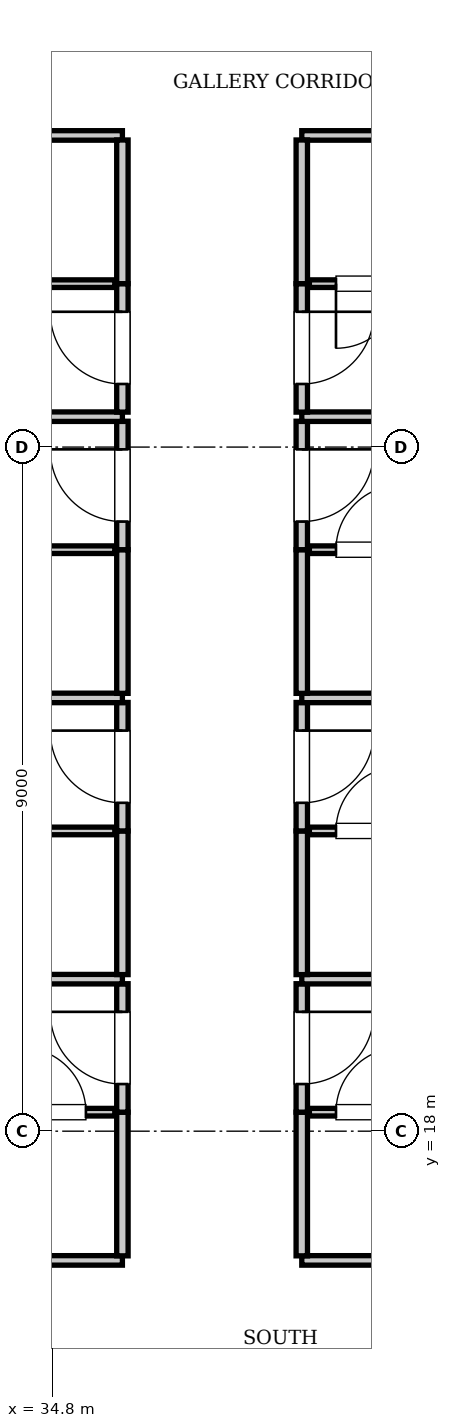
"""IFC4 building model, lengths in metres.
Left out: names, types, materials, properties, quantities, classifications, styles, units other than length and angle.
Written with IfcOpenShell. Run it as: python <this file> out.ifc"""

import sys

from ifc_helpers import new_model, si_unit, direction, frame, frame_2d, origin, place, context, subcontext, project, spatial, rectangle, extrude, element, fill, save


model = new_model("IFC4")
c1 = context("Model", 3, precision=1e-05, world=origin(), true_north=direction((0.0, 1.0)))
c2 = subcontext(c1, "Body", "Model", "MODEL_VIEW")
j1 = project(units=[si_unit("LENGTHUNIT", "METRE"), si_unit("PLANEANGLEUNIT", "RADIAN")], contexts=[c1])
p1 = place(None, origin())
s1 = spatial("IfcSite", under=j1, at=p1, CompositionType="ELEMENT")
p2 = place(p1, origin())
s2 = spatial("IfcBuilding", under=s1, at=p2, CompositionType="ELEMENT")
p3 = place(p2, frame((0.0, 0.0, 189.0)))
s3 = spatial("IfcBuildingStorey", under=s2, at=p3, CompositionType="ELEMENT", Elevation=189.0)
p4 = place(p3, frame((13.2, 16.3, 0.0), z_axis=(0.0, 0.0, 1.0), x_axis=(1.0, 0.0, 0.0)))
e1 = element("IfcWall", 1, at=p4, inside=s3, PredefinedType="PARTITIONING", context=c2, shape_type="SweptSolid", body=[
    extrude(rectangle(XDim=22.52, YDim=0.125, at=frame_2d((11.26, 0.0))), origin(), (0.0, 0.0, 1.0), 3.61),
])
p5 = place(p3, frame((38.08, 16.3, 0.0), z_axis=(0.0, 0.0, 1.0), x_axis=(1.0, 0.0, 0.0)))
e2 = element("IfcWall", 2, at=p5, inside=s3, PredefinedType="PARTITIONING", context=c2, shape_type="SweptSolid", body=[
    extrude(rectangle(XDim=24.32, YDim=0.125, at=frame_2d((12.16, 0.0))), origin(), (0.0, 0.0, 1.0), 3.61),
])
p6 = place(p3, frame((13.2, 31.1, 0.0), z_axis=(0.0, 0.0, 1.0), x_axis=(1.0, 0.0, 0.0)))
e3 = element("IfcWall", 3, at=p6, inside=s3, PredefinedType="PARTITIONING", context=c2, shape_type="SweptSolid", body=[
    extrude(rectangle(XDim=22.52, YDim=0.125, at=frame_2d((11.26, 0.0))), origin(), (0.0, 0.0, 1.0), 3.61),
])
p7 = place(p3, frame((38.08, 31.1, 0.0), z_axis=(0.0, 0.0, 1.0), x_axis=(1.0, 0.0, 0.0)))
e4 = element("IfcWall", 4, at=p7, inside=s3, PredefinedType="PARTITIONING", context=c2, shape_type="SweptSolid", body=[
    extrude(rectangle(XDim=24.32, YDim=0.125, at=frame_2d((12.16, 0.0))), origin(), (0.0, 0.0, 1.0), 3.61),
])
p8 = place(p3, frame((35.72, 16.36, 0.0), z_axis=(0.0, 0.0, 1.0), x_axis=(0.0, 1.0, 0.0)))
e5 = element("IfcWall", 5, at=p8, inside=s3, PredefinedType="PARTITIONING", context=c2, shape_type="SweptSolid", body=[
    extrude(rectangle(XDim=1.89, YDim=0.15, at=frame_2d((0.945, 0.0))), origin(), (0.0, 0.0, 1.0), 3.61),
])
p9 = place(p3, frame((35.72, 18.25, 0.0), z_axis=(0.0, 0.0, 1.0), x_axis=(0.0, 1.0, 0.0)))
e6 = element("IfcWall", 6, at=p9, inside=s3, PredefinedType="PARTITIONING", context=c2, shape_type="SweptSolid", body=[
    extrude(rectangle(XDim=1.69, YDim=0.15, at=frame_2d((0.845, 0.0))), origin(), (0.0, 0.0, 1.0), 3.61),
])
p10 = place(p9, frame((0.37, 0.0, 0.0)))
e7 = element("IfcOpeningElement", 7, at=p10, cuts=e6, PredefinedType="OPENING", context=c2, shape_type="SweptSolid", body=[
    extrude(rectangle(XDim=0.95, YDim=2.15, at=frame_2d((0.475, 1.075))), frame((0.0, 0.085, 0.0), z_axis=(0.0, -1.0, 0.0), x_axis=(1.0, 0.0, 0.0)), (0.0, 0.0, 1.0), 0.17),
])
p11 = place(p3, frame((33.32, 18.25, 0.0), z_axis=(0.0, 0.0, 1.0), x_axis=(1.0, 0.0, 0.0)))
e8 = element("IfcWall", 8, at=p11, inside=s3, PredefinedType="PARTITIONING", context=c2, shape_type="SweptSolid", body=[
    extrude(rectangle(XDim=2.3, YDim=0.1, at=frame_2d((1.15, 0.0))), origin(), (0.0, 0.0, 1.0), 3.61),
])
p12 = place(p11, frame((1.07, 0.0, 0.0)))
e9 = element("IfcOpeningElement", 9, at=p12, cuts=e8, PredefinedType="OPENING", context=c2, shape_type="SweptSolid", body=[
    extrude(rectangle(XDim=0.85, YDim=2.1, at=frame_2d((0.425, 1.05))), frame((0.0, 0.06, 0.0), z_axis=(0.0, -1.0, 0.0), x_axis=(1.0, 0.0, 0.0)), (0.0, 0.0, 1.0), 0.12),
])
p13 = place(p3, frame((38.08, 16.36, 0.0), z_axis=(0.0, 0.0, 1.0), x_axis=(0.0, 1.0, 0.0)))
e10 = element("IfcWall", 10, at=p13, inside=s3, PredefinedType="PARTITIONING", context=c2, shape_type="SweptSolid", body=[
    extrude(rectangle(XDim=1.89, YDim=0.15, at=frame_2d((0.945, 0.0))), origin(), (0.0, 0.0, 1.0), 3.61),
])
p14 = place(p3, frame((38.08, 18.25, 0.0), z_axis=(0.0, 0.0, 1.0), x_axis=(0.0, 1.0, 0.0)))
e11 = element("IfcWall", 11, at=p14, inside=s3, PredefinedType="PARTITIONING", context=c2, shape_type="SweptSolid", body=[
    extrude(rectangle(XDim=1.69, YDim=0.15, at=frame_2d((0.845, 0.0))), origin(), (0.0, 0.0, 1.0), 3.61),
])
p15 = place(p14, frame((0.37, 0.0, 0.0)))
e12 = element("IfcOpeningElement", 12, at=p15, cuts=e11, PredefinedType="OPENING", context=c2, shape_type="SweptSolid", body=[
    extrude(rectangle(XDim=0.95, YDim=2.15, at=frame_2d((0.475, 1.075))), frame((0.0, 0.085, 0.0), z_axis=(0.0, -1.0, 0.0), x_axis=(1.0, 0.0, 0.0)), (0.0, 0.0, 1.0), 0.17),
])
p16 = place(p3, frame((38.18, 18.25, 0.0), z_axis=(0.0, 0.0, 1.0), x_axis=(1.0, 0.0, 0.0)))
e13 = element("IfcWall", 13, at=p16, inside=s3, PredefinedType="PARTITIONING", context=c2, shape_type="SweptSolid", body=[
    extrude(rectangle(XDim=2.3, YDim=0.1, at=frame_2d((1.15, 0.0))), origin(), (0.0, 0.0, 1.0), 3.61),
])
p17 = place(p16, frame((0.35, 0.0, 0.0)))
e14 = element("IfcOpeningElement", 14, at=p17, cuts=e13, PredefinedType="OPENING", context=c2, shape_type="SweptSolid", body=[
    extrude(rectangle(XDim=0.85, YDim=2.1, at=frame_2d((0.425, 1.05))), frame((0.0, 0.06, 0.0), z_axis=(0.0, -1.0, 0.0), x_axis=(1.0, 0.0, 0.0)), (0.0, 0.0, 1.0), 0.12),
])
p18 = place(p3, frame((13.2, 20.0, 0.0), z_axis=(0.0, 0.0, 1.0), x_axis=(1.0, 0.0, 0.0)))
e15 = element("IfcWall", 15, at=p18, inside=s3, PredefinedType="PARTITIONING", context=c2, shape_type="SweptSolid", body=[
    extrude(rectangle(XDim=22.52, YDim=0.125, at=frame_2d((11.26, 0.0))), origin(), (0.0, 0.0, 1.0), 3.61),
])
p19 = place(p3, frame((38.08, 20.0, 0.0), z_axis=(0.0, 0.0, 1.0), x_axis=(1.0, 0.0, 0.0)))
e16 = element("IfcWall", 16, at=p19, inside=s3, PredefinedType="PARTITIONING", context=c2, shape_type="SweptSolid", body=[
    extrude(rectangle(XDim=24.32, YDim=0.125, at=frame_2d((12.16, 0.0))), origin(), (0.0, 0.0, 1.0), 3.61),
])
p20 = place(p3, frame((35.72, 20.06, 0.0), z_axis=(0.0, 0.0, 1.0), x_axis=(0.0, 1.0, 0.0)))
e17 = element("IfcWall", 17, at=p20, inside=s3, PredefinedType="PARTITIONING", context=c2, shape_type="SweptSolid", body=[
    extrude(rectangle(XDim=1.89, YDim=0.15, at=frame_2d((0.945, 0.0))), origin(), (0.0, 0.0, 1.0), 3.61),
])
p21 = place(p3, frame((35.72, 21.95, 0.0), z_axis=(0.0, 0.0, 1.0), x_axis=(0.0, 1.0, 0.0)))
e18 = element("IfcWall", 18, at=p21, inside=s3, PredefinedType="PARTITIONING", context=c2, shape_type="SweptSolid", body=[
    extrude(rectangle(XDim=1.69, YDim=0.15, at=frame_2d((0.845, 0.0))), origin(), (0.0, 0.0, 1.0), 3.61),
])
p22 = place(p21, frame((0.37, 0.0, 0.0)))
e19 = element("IfcOpeningElement", 19, at=p22, cuts=e18, PredefinedType="OPENING", context=c2, shape_type="SweptSolid", body=[
    extrude(rectangle(XDim=0.95, YDim=2.15, at=frame_2d((0.475, 1.075))), frame((0.0, 0.085, 0.0), z_axis=(0.0, -1.0, 0.0), x_axis=(1.0, 0.0, 0.0)), (0.0, 0.0, 1.0), 0.17),
])
p23 = place(p3, frame((33.32, 21.95, 0.0), z_axis=(0.0, 0.0, 1.0), x_axis=(1.0, 0.0, 0.0)))
e20 = element("IfcWall", 20, at=p23, inside=s3, PredefinedType="PARTITIONING", context=c2, shape_type="SweptSolid", body=[
    extrude(rectangle(XDim=2.3, YDim=0.1, at=frame_2d((1.15, 0.0))), origin(), (0.0, 0.0, 1.0), 3.61),
])
p24 = place(p23, frame((0.35, 0.0, 0.0)))
e21 = element("IfcOpeningElement", 21, at=p24, cuts=e20, PredefinedType="OPENING", context=c2, shape_type="SweptSolid", body=[
    extrude(rectangle(XDim=0.85, YDim=2.1, at=frame_2d((0.425, 1.05))), frame((0.0, 0.06, 0.0), z_axis=(0.0, -1.0, 0.0), x_axis=(1.0, 0.0, 0.0)), (0.0, 0.0, 1.0), 0.12),
])
p25 = place(p3, frame((38.08, 20.06, 0.0), z_axis=(0.0, 0.0, 1.0), x_axis=(0.0, 1.0, 0.0)))
e22 = element("IfcWall", 22, at=p25, inside=s3, PredefinedType="PARTITIONING", context=c2, shape_type="SweptSolid", body=[
    extrude(rectangle(XDim=1.89, YDim=0.15, at=frame_2d((0.945, 0.0))), origin(), (0.0, 0.0, 1.0), 3.61),
])
p26 = place(p3, frame((38.08, 21.95, 0.0), z_axis=(0.0, 0.0, 1.0), x_axis=(0.0, 1.0, 0.0)))
e23 = element("IfcWall", 23, at=p26, inside=s3, PredefinedType="PARTITIONING", context=c2, shape_type="SweptSolid", body=[
    extrude(rectangle(XDim=1.69, YDim=0.15, at=frame_2d((0.845, 0.0))), origin(), (0.0, 0.0, 1.0), 3.61),
])
p27 = place(p26, frame((0.37, 0.0, 0.0)))
e24 = element("IfcOpeningElement", 24, at=p27, cuts=e23, PredefinedType="OPENING", context=c2, shape_type="SweptSolid", body=[
    extrude(rectangle(XDim=0.95, YDim=2.15, at=frame_2d((0.475, 1.075))), frame((0.0, 0.085, 0.0), z_axis=(0.0, -1.0, 0.0), x_axis=(1.0, 0.0, 0.0)), (0.0, 0.0, 1.0), 0.17),
])
p28 = place(p3, frame((38.18, 21.95, 0.0), z_axis=(0.0, 0.0, 1.0), x_axis=(1.0, 0.0, 0.0)))
e25 = element("IfcWall", 25, at=p28, inside=s3, PredefinedType="PARTITIONING", context=c2, shape_type="SweptSolid", body=[
    extrude(rectangle(XDim=2.3, YDim=0.1, at=frame_2d((1.15, 0.0))), origin(), (0.0, 0.0, 1.0), 3.61),
])
p29 = place(p28, frame((0.35, 0.0, 0.0)))
e26 = element("IfcOpeningElement", 26, at=p29, cuts=e25, PredefinedType="OPENING", context=c2, shape_type="SweptSolid", body=[
    extrude(rectangle(XDim=0.85, YDim=2.1, at=frame_2d((0.425, 1.05))), frame((0.0, 0.06, 0.0), z_axis=(0.0, -1.0, 0.0), x_axis=(1.0, 0.0, 0.0)), (0.0, 0.0, 1.0), 0.12),
])
p30 = place(p3, frame((13.2, 23.7, 0.0), z_axis=(0.0, 0.0, 1.0), x_axis=(1.0, 0.0, 0.0)))
e27 = element("IfcWall", 27, at=p30, inside=s3, PredefinedType="PARTITIONING", context=c2, shape_type="SweptSolid", body=[
    extrude(rectangle(XDim=22.52, YDim=0.125, at=frame_2d((11.26, 0.0))), origin(), (0.0, 0.0, 1.0), 3.61),
])
p31 = place(p3, frame((38.08, 23.7, 0.0), z_axis=(0.0, 0.0, 1.0), x_axis=(1.0, 0.0, 0.0)))
e28 = element("IfcWall", 28, at=p31, inside=s3, PredefinedType="PARTITIONING", context=c2, shape_type="SweptSolid", body=[
    extrude(rectangle(XDim=24.32, YDim=0.125, at=frame_2d((12.16, 0.0))), origin(), (0.0, 0.0, 1.0), 3.61),
])
p32 = place(p3, frame((35.72, 23.76, 0.0), z_axis=(0.0, 0.0, 1.0), x_axis=(0.0, 1.0, 0.0)))
e29 = element("IfcWall", 29, at=p32, inside=s3, PredefinedType="PARTITIONING", context=c2, shape_type="SweptSolid", body=[
    extrude(rectangle(XDim=1.89, YDim=0.15, at=frame_2d((0.945, 0.0))), origin(), (0.0, 0.0, 1.0), 3.61),
])
p33 = place(p3, frame((35.72, 25.65, 0.0), z_axis=(0.0, 0.0, 1.0), x_axis=(0.0, 1.0, 0.0)))
e30 = element("IfcWall", 30, at=p33, inside=s3, PredefinedType="PARTITIONING", context=c2, shape_type="SweptSolid", body=[
    extrude(rectangle(XDim=1.69, YDim=0.15, at=frame_2d((0.845, 0.0))), origin(), (0.0, 0.0, 1.0), 3.61),
])
p34 = place(p33, frame((0.37, 0.0, 0.0)))
e31 = element("IfcOpeningElement", 31, at=p34, cuts=e30, PredefinedType="OPENING", context=c2, shape_type="SweptSolid", body=[
    extrude(rectangle(XDim=0.95, YDim=2.15, at=frame_2d((0.475, 1.075))), frame((0.0, 0.085, 0.0), z_axis=(0.0, -1.0, 0.0), x_axis=(1.0, 0.0, 0.0)), (0.0, 0.0, 1.0), 0.17),
])
p35 = place(p3, frame((33.32, 25.65, 0.0), z_axis=(0.0, 0.0, 1.0), x_axis=(1.0, 0.0, 0.0)))
e32 = element("IfcWall", 32, at=p35, inside=s3, PredefinedType="PARTITIONING", context=c2, shape_type="SweptSolid", body=[
    extrude(rectangle(XDim=2.3, YDim=0.1, at=frame_2d((1.15, 0.0))), origin(), (0.0, 0.0, 1.0), 3.61),
])
p36 = place(p35, frame((0.35, 0.0, 0.0)))
e33 = element("IfcOpeningElement", 33, at=p36, cuts=e32, PredefinedType="OPENING", context=c2, shape_type="SweptSolid", body=[
    extrude(rectangle(XDim=0.85, YDim=2.1, at=frame_2d((0.425, 1.05))), frame((0.0, 0.06, 0.0), z_axis=(0.0, -1.0, 0.0), x_axis=(1.0, 0.0, 0.0)), (0.0, 0.0, 1.0), 0.12),
])
p37 = place(p3, frame((38.08, 23.76, 0.0), z_axis=(0.0, 0.0, 1.0), x_axis=(0.0, 1.0, 0.0)))
e34 = element("IfcWall", 34, at=p37, inside=s3, PredefinedType="PARTITIONING", context=c2, shape_type="SweptSolid", body=[
    extrude(rectangle(XDim=1.89, YDim=0.15, at=frame_2d((0.945, 0.0))), origin(), (0.0, 0.0, 1.0), 3.61),
])
p38 = place(p3, frame((38.08, 25.65, 0.0), z_axis=(0.0, 0.0, 1.0), x_axis=(0.0, 1.0, 0.0)))
e35 = element("IfcWall", 35, at=p38, inside=s3, PredefinedType="PARTITIONING", context=c2, shape_type="SweptSolid", body=[
    extrude(rectangle(XDim=1.69, YDim=0.15, at=frame_2d((0.845, 0.0))), origin(), (0.0, 0.0, 1.0), 3.61),
])
p39 = place(p38, frame((0.37, 0.0, 0.0)))
e36 = element("IfcOpeningElement", 36, at=p39, cuts=e35, PredefinedType="OPENING", context=c2, shape_type="SweptSolid", body=[
    extrude(rectangle(XDim=0.95, YDim=2.15, at=frame_2d((0.475, 1.075))), frame((0.0, 0.085, 0.0), z_axis=(0.0, -1.0, 0.0), x_axis=(1.0, 0.0, 0.0)), (0.0, 0.0, 1.0), 0.17),
])
p40 = place(p3, frame((38.18, 25.65, 0.0), z_axis=(0.0, 0.0, 1.0), x_axis=(1.0, 0.0, 0.0)))
e37 = element("IfcWall", 37, at=p40, inside=s3, PredefinedType="PARTITIONING", context=c2, shape_type="SweptSolid", body=[
    extrude(rectangle(XDim=2.3, YDim=0.1, at=frame_2d((1.15, 0.0))), origin(), (0.0, 0.0, 1.0), 3.61),
])
p41 = place(p40, frame((0.35, 0.0, 0.0)))
e38 = element("IfcOpeningElement", 38, at=p41, cuts=e37, PredefinedType="OPENING", context=c2, shape_type="SweptSolid", body=[
    extrude(rectangle(XDim=0.85, YDim=2.1, at=frame_2d((0.425, 1.05))), frame((0.0, 0.06, 0.0), z_axis=(0.0, -1.0, 0.0), x_axis=(1.0, 0.0, 0.0)), (0.0, 0.0, 1.0), 0.12),
])
p42 = place(p3, frame((13.2, 27.4, 0.0), z_axis=(0.0, 0.0, 1.0), x_axis=(1.0, 0.0, 0.0)))
e39 = element("IfcWall", 39, at=p42, inside=s3, PredefinedType="PARTITIONING", context=c2, shape_type="SweptSolid", body=[
    extrude(rectangle(XDim=22.52, YDim=0.125, at=frame_2d((11.26, 0.0))), origin(), (0.0, 0.0, 1.0), 3.61),
])
p43 = place(p3, frame((38.08, 27.4, 0.0), z_axis=(0.0, 0.0, 1.0), x_axis=(1.0, 0.0, 0.0)))
e40 = element("IfcWall", 40, at=p43, inside=s3, PredefinedType="PARTITIONING", context=c2, shape_type="SweptSolid", body=[
    extrude(rectangle(XDim=24.32, YDim=0.125, at=frame_2d((12.16, 0.0))), origin(), (0.0, 0.0, 1.0), 3.61),
])
p44 = place(p3, frame((35.72, 27.46, 0.0), z_axis=(0.0, 0.0, 1.0), x_axis=(0.0, 1.0, 0.0)))
e41 = element("IfcWall", 41, at=p44, inside=s3, PredefinedType="PARTITIONING", context=c2, shape_type="SweptSolid", body=[
    extrude(rectangle(XDim=1.69, YDim=0.15, at=frame_2d((0.845, 0.0))), origin(), (0.0, 0.0, 1.0), 3.61),
])
p45 = place(p44, frame((0.37, 0.0, 0.0)))
e42 = element("IfcOpeningElement", 42, at=p45, cuts=e41, PredefinedType="OPENING", context=c2, shape_type="SweptSolid", body=[
    extrude(rectangle(XDim=0.95, YDim=2.15, at=frame_2d((0.475, 1.075))), frame((0.0, 0.085, 0.0), z_axis=(0.0, -1.0, 0.0), x_axis=(1.0, 0.0, 0.0)), (0.0, 0.0, 1.0), 0.17),
])
p46 = place(p3, frame((35.72, 29.15, 0.0), z_axis=(0.0, 0.0, 1.0), x_axis=(0.0, 1.0, 0.0)))
e43 = element("IfcWall", 43, at=p46, inside=s3, PredefinedType="PARTITIONING", context=c2, shape_type="SweptSolid", body=[
    extrude(rectangle(XDim=1.89, YDim=0.15, at=frame_2d((0.945, 0.0))), origin(), (0.0, 0.0, 1.0), 3.61),
])
p47 = place(p3, frame((33.32, 29.15, 0.0), z_axis=(0.0, 0.0, 1.0), x_axis=(1.0, 0.0, 0.0)))
e44 = element("IfcWall", 44, at=p47, inside=s3, PredefinedType="PARTITIONING", context=c2, shape_type="SweptSolid", body=[
    extrude(rectangle(XDim=2.3, YDim=0.1, at=frame_2d((1.15, 0.0))), origin(), (0.0, 0.0, 1.0), 3.61),
])
p48 = place(p47, frame((0.35, 0.0, 0.0)))
e45 = element("IfcOpeningElement", 45, at=p48, cuts=e44, PredefinedType="OPENING", context=c2, shape_type="SweptSolid", body=[
    extrude(rectangle(XDim=0.85, YDim=2.1, at=frame_2d((0.425, 1.05))), frame((0.0, 0.06, 0.0), z_axis=(0.0, -1.0, 0.0), x_axis=(1.0, 0.0, 0.0)), (0.0, 0.0, 1.0), 0.12),
])
p49 = place(p3, frame((38.08, 27.46, 0.0), z_axis=(0.0, 0.0, 1.0), x_axis=(0.0, 1.0, 0.0)))
e46 = element("IfcWall", 46, at=p49, inside=s3, PredefinedType="PARTITIONING", context=c2, shape_type="SweptSolid", body=[
    extrude(rectangle(XDim=1.69, YDim=0.15, at=frame_2d((0.845, 0.0))), origin(), (0.0, 0.0, 1.0), 3.61),
])
p50 = place(p49, frame((0.37, 0.0, 0.0)))
e47 = element("IfcOpeningElement", 47, at=p50, cuts=e46, PredefinedType="OPENING", context=c2, shape_type="SweptSolid", body=[
    extrude(rectangle(XDim=0.95, YDim=2.15, at=frame_2d((0.475, 1.075))), frame((0.0, 0.085, 0.0), z_axis=(0.0, -1.0, 0.0), x_axis=(1.0, 0.0, 0.0)), (0.0, 0.0, 1.0), 0.17),
])
p51 = place(p3, frame((38.08, 29.15, 0.0), z_axis=(0.0, 0.0, 1.0), x_axis=(0.0, 1.0, 0.0)))
e48 = element("IfcWall", 48, at=p51, inside=s3, PredefinedType="PARTITIONING", context=c2, shape_type="SweptSolid", body=[
    extrude(rectangle(XDim=1.89, YDim=0.15, at=frame_2d((0.945, 0.0))), origin(), (0.0, 0.0, 1.0), 3.61),
])
p52 = place(p3, frame((38.18, 29.15, 0.0), z_axis=(0.0, 0.0, 1.0), x_axis=(1.0, 0.0, 0.0)))
e49 = element("IfcWall", 49, at=p52, inside=s3, PredefinedType="PARTITIONING", context=c2, shape_type="SweptSolid", body=[
    extrude(rectangle(XDim=2.3, YDim=0.1, at=frame_2d((1.15, 0.0))), origin(), (0.0, 0.0, 1.0), 3.61),
])
p53 = place(p52, frame((0.35, 0.0, 0.0)))
e50 = element("IfcOpeningElement", 50, at=p53, cuts=e49, PredefinedType="OPENING", context=c2, shape_type="SweptSolid", body=[
    extrude(rectangle(XDim=0.85, YDim=2.1, at=frame_2d((0.425, 1.05))), frame((0.0, 0.06, 0.0), z_axis=(0.0, -1.0, 0.0), x_axis=(1.0, 0.0, 0.0)), (0.0, 0.0, 1.0), 0.12),
])
p54 = place(p12, origin())
e51 = element("IfcDoor", 51, at=p54, inside=s3, OperationType="SINGLE_SWING_LEFT", PredefinedType="DOOR", context=c2, shape_type="SweptSolid", body=[
    extrude(rectangle(XDim=0.85, YDim=2.1, at=frame_2d((0.425, 1.05))), frame((0.0, 0.025, 0.0), z_axis=(0.0, -1.0, 0.0), x_axis=(1.0, 0.0, 0.0)), (0.0, 0.0, 1.0), 0.05),
])
fill(e9, e51)
p55 = place(p10, origin())
e52 = element("IfcDoor", 52, at=p55, inside=s3, OperationType="SINGLE_SWING_RIGHT", PredefinedType="DOOR", context=c2, shape_type="SweptSolid", body=[
    extrude(rectangle(XDim=0.95, YDim=2.15, at=frame_2d((0.475, 1.075))), frame((0.0, 0.025, 0.0), z_axis=(0.0, -1.0, 0.0), x_axis=(1.0, 0.0, 0.0)), (0.0, 0.0, 1.0), 0.05),
])
fill(e7, e52)
p56 = place(p17, origin())
e53 = element("IfcDoor", 53, at=p56, inside=s3, OperationType="SINGLE_SWING_RIGHT", PredefinedType="DOOR", context=c2, shape_type="SweptSolid", body=[
    extrude(rectangle(XDim=0.85, YDim=2.1, at=frame_2d((0.425, 1.05))), frame((0.0, 0.025, 0.0), z_axis=(0.0, -1.0, 0.0), x_axis=(1.0, 0.0, 0.0)), (0.0, 0.0, 1.0), 0.05),
])
fill(e14, e53)
p57 = place(p15, frame((0.95, 0.0, 0.0), z_axis=(0.0, 0.0, 1.0), x_axis=(-1.0, 0.0, 0.0)))
e54 = element("IfcDoor", 54, at=p57, inside=s3, OperationType="SINGLE_SWING_LEFT", PredefinedType="DOOR", context=c2, shape_type="SweptSolid", body=[
    extrude(rectangle(XDim=0.95, YDim=2.15, at=frame_2d((0.475, 1.075))), frame((0.0, 0.025, 0.0), z_axis=(0.0, -1.0, 0.0), x_axis=(1.0, 0.0, 0.0)), (0.0, 0.0, 1.0), 0.05),
])
fill(e12, e54)
p58 = place(p22, origin())
e55 = element("IfcDoor", 55, at=p58, inside=s3, OperationType="SINGLE_SWING_RIGHT", PredefinedType="DOOR", context=c2, shape_type="SweptSolid", body=[
    extrude(rectangle(XDim=0.95, YDim=2.15, at=frame_2d((0.475, 1.075))), frame((0.0, 0.025, 0.0), z_axis=(0.0, -1.0, 0.0), x_axis=(1.0, 0.0, 0.0)), (0.0, 0.0, 1.0), 0.05),
])
fill(e19, e55)
p59 = place(p29, origin())
e56 = element("IfcDoor", 56, at=p59, inside=s3, OperationType="SINGLE_SWING_RIGHT", PredefinedType="DOOR", context=c2, shape_type="SweptSolid", body=[
    extrude(rectangle(XDim=0.85, YDim=2.1, at=frame_2d((0.425, 1.05))), frame((0.0, 0.025, 0.0), z_axis=(0.0, -1.0, 0.0), x_axis=(1.0, 0.0, 0.0)), (0.0, 0.0, 1.0), 0.05),
])
fill(e26, e56)
p60 = place(p27, frame((0.95, 0.0, 0.0), z_axis=(0.0, 0.0, 1.0), x_axis=(-1.0, 0.0, 0.0)))
e57 = element("IfcDoor", 57, at=p60, inside=s3, OperationType="SINGLE_SWING_LEFT", PredefinedType="DOOR", context=c2, shape_type="SweptSolid", body=[
    extrude(rectangle(XDim=0.95, YDim=2.15, at=frame_2d((0.475, 1.075))), frame((0.0, 0.025, 0.0), z_axis=(0.0, -1.0, 0.0), x_axis=(1.0, 0.0, 0.0)), (0.0, 0.0, 1.0), 0.05),
])
fill(e24, e57)
p61 = place(p34, origin())
e58 = element("IfcDoor", 58, at=p61, inside=s3, OperationType="SINGLE_SWING_RIGHT", PredefinedType="DOOR", context=c2, shape_type="SweptSolid", body=[
    extrude(rectangle(XDim=0.95, YDim=2.15, at=frame_2d((0.475, 1.075))), frame((0.0, 0.025, 0.0), z_axis=(0.0, -1.0, 0.0), x_axis=(1.0, 0.0, 0.0)), (0.0, 0.0, 1.0), 0.05),
])
fill(e31, e58)
p62 = place(p41, origin())
e59 = element("IfcDoor", 59, at=p62, inside=s3, OperationType="SINGLE_SWING_RIGHT", PredefinedType="DOOR", context=c2, shape_type="SweptSolid", body=[
    extrude(rectangle(XDim=0.85, YDim=2.1, at=frame_2d((0.425, 1.05))), frame((0.0, 0.025, 0.0), z_axis=(0.0, -1.0, 0.0), x_axis=(1.0, 0.0, 0.0)), (0.0, 0.0, 1.0), 0.05),
])
fill(e38, e59)
p63 = place(p39, frame((0.95, 0.0, 0.0), z_axis=(0.0, 0.0, 1.0), x_axis=(-1.0, 0.0, 0.0)))
e60 = element("IfcDoor", 60, at=p63, inside=s3, OperationType="SINGLE_SWING_LEFT", PredefinedType="DOOR", context=c2, shape_type="SweptSolid", body=[
    extrude(rectangle(XDim=0.95, YDim=2.15, at=frame_2d((0.475, 1.075))), frame((0.0, 0.025, 0.0), z_axis=(0.0, -1.0, 0.0), x_axis=(1.0, 0.0, 0.0)), (0.0, 0.0, 1.0), 0.05),
])
fill(e36, e60)
p64 = place(p45, origin())
e61 = element("IfcDoor", 61, at=p64, inside=s3, OperationType="SINGLE_SWING_RIGHT", PredefinedType="DOOR", context=c2, shape_type="SweptSolid", body=[
    extrude(rectangle(XDim=0.95, YDim=2.15, at=frame_2d((0.475, 1.075))), frame((0.0, 0.025, 0.0), z_axis=(0.0, -1.0, 0.0), x_axis=(1.0, 0.0, 0.0)), (0.0, 0.0, 1.0), 0.05),
])
fill(e42, e61)
p65 = place(p53, frame((0.85, 0.0, 0.0), z_axis=(0.0, 0.0, 1.0), x_axis=(-1.0, 0.0, 0.0)))
e62 = element("IfcDoor", 62, at=p65, inside=s3, OperationType="SINGLE_SWING_RIGHT", PredefinedType="DOOR", context=c2, shape_type="SweptSolid", body=[
    extrude(rectangle(XDim=0.85, YDim=2.1, at=frame_2d((0.425, 1.05))), frame((0.0, 0.025, 0.0), z_axis=(0.0, -1.0, 0.0), x_axis=(1.0, 0.0, 0.0)), (0.0, 0.0, 1.0), 0.05),
])
fill(e50, e62)
p66 = place(p50, frame((0.95, 0.0, 0.0), z_axis=(0.0, 0.0, 1.0), x_axis=(-1.0, 0.0, 0.0)))
e63 = element("IfcDoor", 63, at=p66, inside=s3, OperationType="SINGLE_SWING_LEFT", PredefinedType="DOOR", context=c2, shape_type="SweptSolid", body=[
    extrude(rectangle(XDim=0.95, YDim=2.15, at=frame_2d((0.475, 1.075))), frame((0.0, 0.025, 0.0), z_axis=(0.0, -1.0, 0.0), x_axis=(1.0, 0.0, 0.0)), (0.0, 0.0, 1.0), 0.05),
])
fill(e47, e63)
save(model, sys.argv[1])
